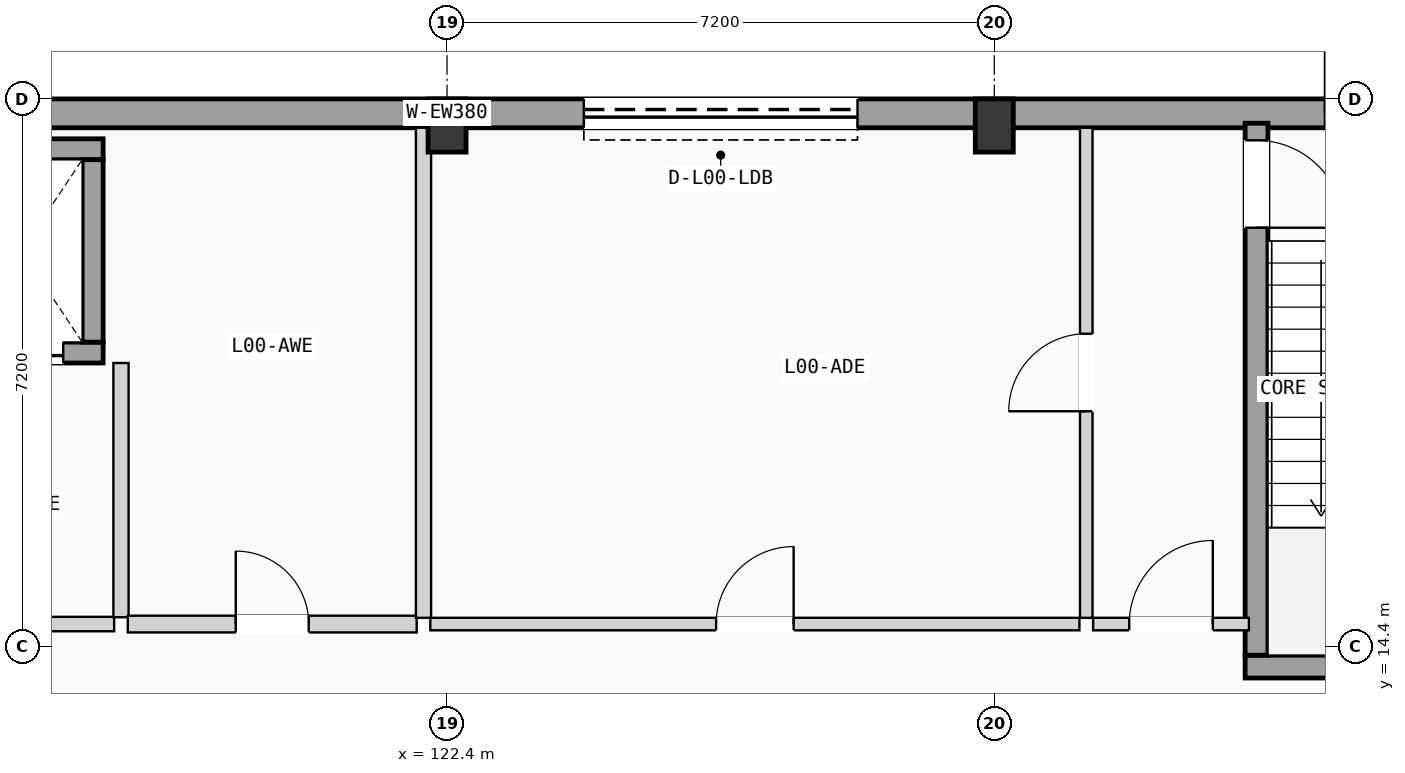
"""IFC4 building model, lengths in metres.
Left out: names, types, materials, properties, quantities, classifications, styles, units other than length and angle.
Written with IfcOpenShell. Run it as: python <this file> out.ifc"""

import sys

from ifc_helpers import new_model, si_unit, direction, frame, frame_2d, origin, origin_2d, place, context, subcontext, project, spatial, rectangle, extrude, element, fill, save


model = new_model("IFC4")
c1 = context("Model", 3, precision=1e-05, world=origin(), true_north=direction((0.0, 1.0)))
c2 = subcontext(c1, "Body", "Model", "MODEL_VIEW")
j1 = project(units=[si_unit("LENGTHUNIT", "METRE"), si_unit("PLANEANGLEUNIT", "RADIAN")], contexts=[c1])
p1 = place(None, origin())
s1 = spatial("IfcSite", under=j1, at=p1, CompositionType="ELEMENT")
p2 = place(p1, origin())
s2 = spatial("IfcBuilding", under=s1, at=p2, CompositionType="ELEMENT")
p3 = place(p2, origin())
s3 = spatial("IfcBuildingStorey", under=s2, at=p3, CompositionType="ELEMENT", Elevation=0.0)
for number, where, z_axis, x_axis in (
    (1, (122.4, 21.25, 0.0), (0.0, 0.0, 1.0), (1.0, 0.0, 0.0)),
    (2, (129.6, 21.25, 0.0), (0.0, 0.0, 1.0), (1.0, 0.0, 0.0)),
):
    element("IfcColumn", number, at=place(p3, frame(where, z_axis=z_axis, x_axis=x_axis)), inside=s3, PredefinedType="COLUMN", context=c2, shape_type="SweptSolid", body=[
        extrude(rectangle(XDim=0.5, YDim=0.7, at=origin_2d()), origin(), (0.0, 0.0, 1.0), 4.9),
    ])
p4 = place(p3, frame((108.0, 21.41, 0.0), z_axis=(0.0, 0.0, 1.0), x_axis=(1.0, 0.0, 0.0)))
e3 = element("IfcWall", 3, at=p4, inside=s3, PredefinedType="SOLIDWALL", context=c2, shape_type="SweptSolid", body=[
    extrude(rectangle(XDim=28.8, YDim=0.38, at=frame_2d((14.4, 0.0))), origin(), (0.0, 0.0, 1.0), 4.625),
])
p5 = place(p4, frame((1.55, 0.0, 0.0)))
e4 = element("IfcOpeningElement", 4, at=p5, cuts=e3, PredefinedType="OPENING", context=c2, shape_type="SweptSolid", body=[
    extrude(rectangle(XDim=1.3, YDim=2.2, at=frame_2d((0.65, 1.1))), frame((0.0, 0.2, 0.0), z_axis=(0.0, -1.0, 0.0), x_axis=(1.0, 0.0, 0.0)), (0.0, 0.0, 1.0), 0.4),
])
p6 = place(p4, frame((25.95, 0.0, 0.0)))
e5 = element("IfcOpeningElement", 5, at=p6, cuts=e3, PredefinedType="OPENING", context=c2, shape_type="SweptSolid", body=[
    extrude(rectangle(XDim=1.3, YDim=2.2, at=frame_2d((0.65, 1.1))), frame((0.0, 0.2, 0.0), z_axis=(0.0, -1.0, 0.0), x_axis=(1.0, 0.0, 0.0)), (0.0, 0.0, 1.0), 0.4),
])
p7 = place(p4, frame((16.2, 0.0, 0.0)))
e6 = element("IfcOpeningElement", 6, at=p7, cuts=e3, PredefinedType="OPENING", context=c2, shape_type="SweptSolid", body=[
    extrude(rectangle(XDim=3.6, YDim=3.8, at=frame_2d((1.8, 1.9))), frame((0.0, 0.2, 0.0), z_axis=(0.0, -1.0, 0.0), x_axis=(1.0, 0.0, 0.0)), (0.0, 0.0, 1.0), 0.4),
])
p8 = place(p3, frame((132.9, 14.13, 0.0), z_axis=(0.0, 0.0, 1.0), x_axis=(1.0, 0.0, 0.0)))
e7 = element("IfcWall", 7, at=p8, inside=s3, PredefinedType="SHEAR", context=c2, shape_type="SweptSolid", body=[
    extrude(rectangle(XDim=3.6, YDim=0.3, at=frame_2d((1.8, 0.0))), origin(), (0.0, 0.0, 1.0), 4.625),
])
p9 = place(p3, frame((133.05, 14.28, 0.0), z_axis=(0.0, 0.0, 1.0), x_axis=(0.0, 1.0, 0.0)))
e8 = element("IfcWall", 8, at=p9, inside=s3, PredefinedType="SHEAR", context=c2, shape_type="SweptSolid", body=[
    extrude(rectangle(XDim=7.0, YDim=0.3, at=frame_2d((3.5, 0.0))), origin(), (0.0, 0.0, 1.0), 4.625),
])
p10 = place(p9, frame((5.625, 0.0, 0.0)))
e9 = element("IfcOpeningElement", 9, at=p10, cuts=e8, PredefinedType="OPENING", context=c2, shape_type="SweptSolid", body=[
    extrude(rectangle(XDim=1.15, YDim=2.12, at=frame_2d((0.575, 1.06))), frame((0.0, 0.16, 0.0), z_axis=(0.0, -1.0, 0.0), x_axis=(1.0, 0.0, 0.0)), (0.0, 0.0, 1.0), 0.32),
])
p11 = place(p3, frame((115.725, 18.262, 0.0), z_axis=(0.0, 0.0, 1.0), x_axis=(1.0, 0.0, 0.0)))
e10 = element("IfcWall", 10, at=p11, inside=s3, PredefinedType="SHEAR", context=c2, shape_type="SweptSolid", body=[
    extrude(rectangle(XDim=2.15, YDim=0.275, at=frame_2d((1.075, 0.0))), origin(), (0.0, 0.0, 1.0), 4.625),
])
p12 = place(p11, frame((0.525, 0.0, 0.0)))
e11 = element("IfcOpeningElement", 11, at=p12, cuts=e10, PredefinedType="OPENING", context=c2, shape_type="SweptSolid", body=[
    extrude(rectangle(XDim=1.1, YDim=2.15, at=frame_2d((0.55, 1.075))), frame((0.0, 0.147, 0.0), z_axis=(0.0, -1.0, 0.0), x_axis=(1.0, 0.0, 0.0)), (0.0, 0.0, 1.0), 0.295),
])
p13 = place(p3, frame((115.45, 20.938, 0.0), z_axis=(0.0, 0.0, 1.0), x_axis=(1.0, 0.0, 0.0)))
e12 = element("IfcWall", 12, at=p13, inside=s3, PredefinedType="SHEAR", context=c2, shape_type="SweptSolid", body=[
    extrude(rectangle(XDim=2.425, YDim=0.275, at=frame_2d((1.212, 0.0))), origin(), (0.0, 0.0, 1.0), 4.625),
])
p14 = place(p3, frame((117.738, 18.4, 0.0), z_axis=(0.0, 0.0, 1.0), x_axis=(0.0, 1.0, 0.0)))
e13 = element("IfcWall", 13, at=p14, inside=s3, PredefinedType="SHEAR", context=c2, shape_type="SweptSolid", body=[
    extrude(rectangle(XDim=2.4, YDim=0.275, at=frame_2d((1.2, 0.0))), origin(), (0.0, 0.0, 1.0), 4.625),
])
p15 = place(p3, frame((111.85, 14.69, 0.0), z_axis=(0.0, 0.0, 1.0), x_axis=(1.0, 0.0, 0.0)))
e14 = element("IfcWall", 14, at=p15, inside=s3, PredefinedType="PARTITIONING", context=c2, shape_type="SweptSolid", body=[
    extrude(rectangle(XDim=6.17, YDim=0.19, at=frame_2d((3.085, 0.0))), origin(), (0.0, 0.0, 1.0), 3.84),
])
p16 = place(p15, frame((2.535, 0.0, 0.0)))
e15 = element("IfcOpeningElement", 15, at=p16, cuts=e14, PredefinedType="OPENING", context=c2, shape_type="SweptSolid", body=[
    extrude(rectangle(XDim=1.1, YDim=2.12, at=frame_2d((0.55, 1.06))), frame((0.0, 0.105, 0.0), z_axis=(0.0, -1.0, 0.0), x_axis=(1.0, 0.0, 0.0)), (0.0, 0.0, 1.0), 0.21),
])
p17 = place(p3, frame((118.11, 14.78, 0.0), z_axis=(0.0, 0.0, 1.0), x_axis=(0.0, 1.0, 0.0)))
e16 = element("IfcWall", 16, at=p17, inside=s3, PredefinedType="PLUMBINGWALL", context=c2, shape_type="SweptSolid", body=[
    extrude(rectangle(XDim=3.345, YDim=0.2, at=frame_2d((1.672, 0.0))), origin(), (0.0, 0.0, 1.0), 3.84),
])
p18 = place(p3, frame((130.9, 14.69, 0.0), z_axis=(0.0, 0.0, 1.0), x_axis=(1.0, 0.0, 0.0)))
e17 = element("IfcWall", 17, at=p18, inside=s3, PredefinedType="PARTITIONING", context=c2, shape_type="SweptSolid", body=[
    extrude(rectangle(XDim=2.05, YDim=0.165, at=frame_2d((1.025, 0.0))), origin(), (0.0, 0.0, 1.0), 3.84),
])
p19 = place(p18, frame((0.475, 0.0, 0.0)))
e18 = element("IfcOpeningElement", 18, at=p19, cuts=e17, PredefinedType="OPENING", context=c2, shape_type="SweptSolid", body=[
    extrude(rectangle(XDim=1.1, YDim=2.12, at=frame_2d((0.55, 1.06))), frame((0.0, 0.093, 0.0), z_axis=(0.0, -1.0, 0.0), x_axis=(1.0, 0.0, 0.0)), (0.0, 0.0, 1.0), 0.185),
])
p20 = place(p3, frame((118.2, 14.69, 0.0), z_axis=(0.0, 0.0, 1.0), x_axis=(1.0, 0.0, 0.0)))
e19 = element("IfcWall", 19, at=p20, inside=s3, PredefinedType="PLUMBINGWALL", context=c2, shape_type="SweptSolid", body=[
    extrude(rectangle(XDim=3.8, YDim=0.22, at=frame_2d((1.9, 0.0))), origin(), (0.0, 0.0, 1.0), 3.84),
])
p21 = place(p20, frame((1.42, 0.0, 0.0)))
e20 = element("IfcOpeningElement", 20, at=p21, cuts=e19, PredefinedType="OPENING", context=c2, shape_type="SweptSolid", body=[
    extrude(rectangle(XDim=0.96, YDim=2.05, at=frame_2d((0.48, 1.025))), frame((0.0, 0.12, 0.0), z_axis=(0.0, -1.0, 0.0), x_axis=(1.0, 0.0, 0.0)), (0.0, 0.0, 1.0), 0.24),
])
p22 = place(p3, frame((122.18, 14.69, 0.0), z_axis=(0.0, 0.0, 1.0), x_axis=(1.0, 0.0, 0.0)))
e21 = element("IfcWall", 21, at=p22, inside=s3, PredefinedType="PARTITIONING", context=c2, shape_type="SweptSolid", body=[
    extrude(rectangle(XDim=8.54, YDim=0.165, at=frame_2d((4.27, 0.0))), origin(), (0.0, 0.0, 1.0), 3.84),
])
p23 = place(p22, frame((3.76, 0.0, 0.0)))
e22 = element("IfcOpeningElement", 22, at=p23, cuts=e21, PredefinedType="OPENING", context=c2, shape_type="SweptSolid", body=[
    extrude(rectangle(XDim=1.02, YDim=2.16, at=frame_2d((0.51, 1.08))), frame((0.0, 0.093, 0.0), z_axis=(0.0, -1.0, 0.0), x_axis=(1.0, 0.0, 0.0)), (0.0, 0.0, 1.0), 0.185),
])
p24 = place(p3, frame((130.81, 14.772, 0.0), z_axis=(0.0, 0.0, 1.0), x_axis=(0.0, 1.0, 0.0)))
e23 = element("IfcWall", 23, at=p24, inside=s3, PredefinedType="PARTITIONING", context=c2, shape_type="SweptSolid", body=[
    extrude(rectangle(XDim=6.448, YDim=0.165, at=frame_2d((3.224, 0.0))), origin(), (0.0, 0.0, 1.0), 3.84),
])
p25 = place(p24, frame((2.718, 0.0, 0.0)))
e24 = element("IfcOpeningElement", 24, at=p25, cuts=e23, PredefinedType="OPENING", context=c2, shape_type="SweptSolid", body=[
    extrude(rectangle(XDim=1.02, YDim=2.16, at=frame_2d((0.51, 1.08))), frame((0.0, 0.093, 0.0), z_axis=(0.0, -1.0, 0.0), x_axis=(1.0, 0.0, 0.0)), (0.0, 0.0, 1.0), 0.185),
])
p26 = place(p3, frame((122.09, 14.772, 0.0), z_axis=(0.0, 0.0, 1.0), x_axis=(0.0, 1.0, 0.0)))
e25 = element("IfcWall", 25, at=p26, inside=s3, PredefinedType="PLUMBINGWALL", context=c2, shape_type="SweptSolid", body=[
    extrude(rectangle(XDim=6.448, YDim=0.2, at=frame_2d((3.224, 0.0))), origin(), (0.0, 0.0, 1.0), 3.84),
])
p27 = place(p6, origin())
e26 = element("IfcDoor", 26, at=p27, inside=s3, OperationType="SINGLE_SWING_LEFT", PredefinedType="DOOR", context=c2, shape_type="SweptSolid", body=[
    extrude(rectangle(XDim=1.3, YDim=2.2, at=frame_2d((0.65, 1.1))), frame((0.0, 0.025, 0.0), z_axis=(0.0, -1.0, 0.0), x_axis=(1.0, 0.0, 0.0)), (0.0, 0.0, 1.0), 0.05),
])
fill(e5, e26)
p28 = place(p7, origin())
e27 = element("IfcDoor", 27, at=p28, inside=s3, OperationType="ROLLINGUP", PredefinedType="DOOR", context=c2, shape_type="SweptSolid", body=[
    extrude(rectangle(XDim=3.6, YDim=3.8, at=frame_2d((1.8, 1.9))), frame((0.0, 0.025, 0.0), z_axis=(0.0, -1.0, 0.0), x_axis=(1.0, 0.0, 0.0)), (0.0, 0.0, 1.0), 0.05),
])
fill(e6, e27)
p29 = place(p10, frame((1.15, 0.0, 0.0), z_axis=(0.0, 0.0, 1.0), x_axis=(-1.0, 0.0, 0.0)))
e28 = element("IfcDoor", 28, at=p29, inside=s3, OperationType="SINGLE_SWING_LEFT", PredefinedType="DOOR", context=c2, shape_type="SweptSolid", body=[
    extrude(rectangle(XDim=1.15, YDim=2.12, at=frame_2d((0.575, 1.06))), frame((0.0, 0.025, 0.0), z_axis=(0.0, -1.0, 0.0), x_axis=(1.0, 0.0, 0.0)), (0.0, 0.0, 1.0), 0.05),
])
fill(e9, e28)
p30 = place(p12, origin())
e29 = element("IfcDoor", 29, at=p30, inside=s3, OperationType="SLIDING_TO_LEFT", PredefinedType="DOOR", context=c2, shape_type="SweptSolid", body=[
    extrude(rectangle(XDim=1.1, YDim=2.15, at=frame_2d((0.55, 1.075))), frame((0.0, 0.025, 0.0), z_axis=(0.0, -1.0, 0.0), x_axis=(1.0, 0.0, 0.0)), (0.0, 0.0, 1.0), 0.05),
])
fill(e11, e29)
p31 = place(p19, origin())
e30 = element("IfcDoor", 30, at=p31, inside=s3, OperationType="SINGLE_SWING_RIGHT", PredefinedType="DOOR", context=c2, shape_type="SweptSolid", body=[
    extrude(rectangle(XDim=1.1, YDim=2.12, at=frame_2d((0.55, 1.06))), frame((0.0, 0.025, 0.0), z_axis=(0.0, -1.0, 0.0), x_axis=(1.0, 0.0, 0.0)), (0.0, 0.0, 1.0), 0.05),
])
fill(e18, e30)
p32 = place(p21, origin())
e31 = element("IfcDoor", 31, at=p32, inside=s3, OperationType="SINGLE_SWING_LEFT", PredefinedType="DOOR", context=c2, shape_type="SweptSolid", body=[
    extrude(rectangle(XDim=0.96, YDim=2.05, at=frame_2d((0.48, 1.025))), frame((0.0, 0.025, 0.0), z_axis=(0.0, -1.0, 0.0), x_axis=(1.0, 0.0, 0.0)), (0.0, 0.0, 1.0), 0.05),
])
fill(e20, e31)
p33 = place(p23, origin())
e32 = element("IfcDoor", 32, at=p33, inside=s3, OperationType="SINGLE_SWING_RIGHT", PredefinedType="DOOR", context=c2, shape_type="SweptSolid", body=[
    extrude(rectangle(XDim=1.02, YDim=2.16, at=frame_2d((0.51, 1.08))), frame((0.0, 0.025, 0.0), z_axis=(0.0, -1.0, 0.0), x_axis=(1.0, 0.0, 0.0)), (0.0, 0.0, 1.0), 0.05),
])
fill(e22, e32)
p34 = place(p25, origin())
e33 = element("IfcDoor", 33, at=p34, inside=s3, OperationType="SINGLE_SWING_LEFT", PredefinedType="DOOR", context=c2, shape_type="SweptSolid", body=[
    extrude(rectangle(XDim=1.02, YDim=2.16, at=frame_2d((0.51, 1.08))), frame((0.0, 0.025, 0.0), z_axis=(0.0, -1.0, 0.0), x_axis=(1.0, 0.0, 0.0)), (0.0, 0.0, 1.0), 0.05),
])
fill(e24, e33)
save(model, sys.argv[1])
